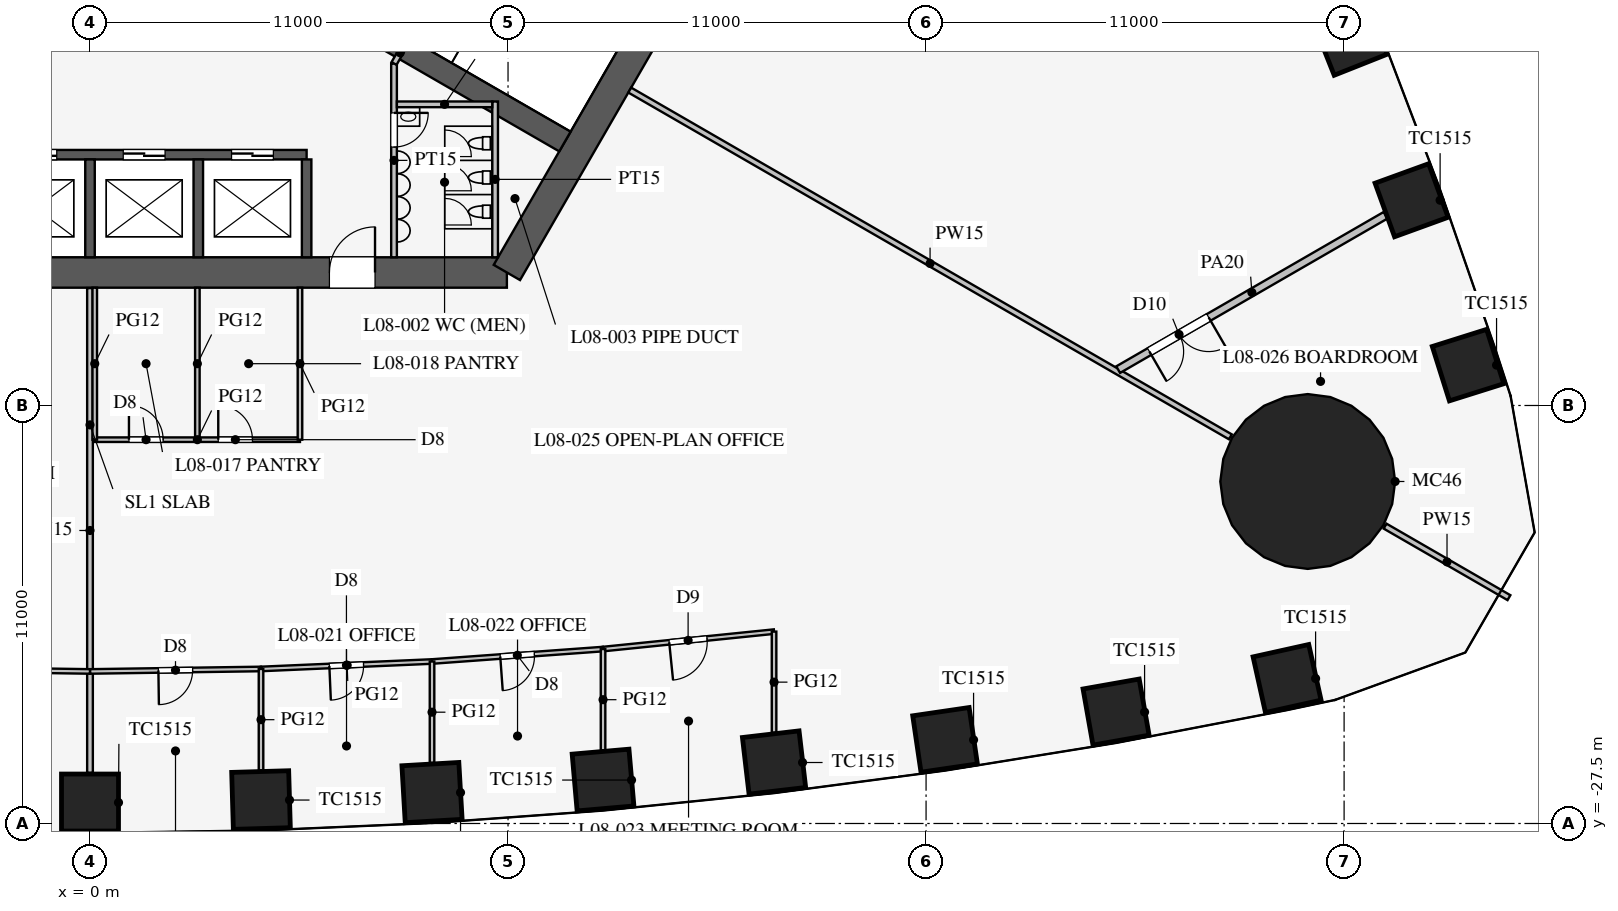
"""IFC4 building model, lengths in metres.
Left out: names, types, materials, properties, quantities, classifications, styles, units other than length and angle.
Written with IfcOpenShell. Run it as: python <this file> out.ifc"""

import sys

from ifc_helpers import new_model, si_unit, direction, frame, frame_2d, origin, origin_2d, place, context, subcontext, project, spatial, rectangle, circle, extrude, element, fill, save


model = new_model("IFC4")
c1 = context("Model", 3, precision=1e-05, world=origin(), true_north=direction((0.0, 1.0)))
c2 = subcontext(c1, "Body", "Model", "MODEL_VIEW")
j1 = project(units=[si_unit("LENGTHUNIT", "METRE"), si_unit("PLANEANGLEUNIT", "RADIAN")], contexts=[c1])
p1 = place(None, origin())
s1 = spatial("IfcSite", under=j1, at=p1, CompositionType="ELEMENT")
p2 = place(p1, origin())
s2 = spatial("IfcBuilding", under=s1, at=p2, CompositionType="ELEMENT")
p3 = place(p2, frame((0.0, 0.0, 37.5)))
s3 = spatial("IfcBuildingStorey", under=s2, at=p3, CompositionType="ELEMENT", Elevation=37.5)
for number, where, z_axis, x_axis in (
    (1, (0.0, -26.949, 0.0), (0.0, 0.0, 1.0), (1.0, 0.0, 0.0)),
    (2, (4.5, -26.883, 0.0), (0.0, 0.0, 1.0), (1.0, 0.029, 0.0)),
    (3, (9.0, -26.686, 0.0), (0.0, 0.0, 1.0), (0.998, 0.058, 0.0)),
    (4, (13.5, -26.357, 0.0), (0.0, 0.0, 1.0), (0.996, 0.087, 0.0)),
    (5, (18.0, -25.895, 0.0), (0.0, 0.0, 1.0), (0.993, 0.116, 0.0)),
    (6, (22.5, -25.299, 0.0), (0.0, 0.0, 1.0), (0.989, 0.145, 0.0)),
    (7, (27.0, -24.568, 0.0), (0.0, 0.0, 1.0), (0.985, 0.174, 0.0)),
    (8, (31.5, -23.685, 0.0), (0.0, 0.0, 1.0), (0.976, 0.217, 0.0)),
    (9, (36.262, -15.438, 0.0), (0.0, 0.0, 1.0), (-0.3, 0.954, 0.0)),
    (10, (34.776, -11.099, 0.0), (0.0, 0.0, 1.0), (-0.342, 0.94, 0.0)),
    (11, (33.16, -6.836, 0.0), (0.0, 0.0, 1.0), (-0.369, 0.929, 0.0)),
):
    element("IfcColumn", number, at=place(p3, frame(where, z_axis=z_axis, x_axis=x_axis)), inside=s3, PredefinedType="COLUMN", context=c2, shape_type="SweptSolid", body=[
        extrude(rectangle(XDim=1.5, YDim=1.5, at=origin_2d()), origin(), (0.0, 0.0, 1.0), 4.2),
    ])
p4 = place(p3, frame((32.043, -18.5, 0.0), z_axis=(0.0, 0.0, 1.0), x_axis=(1.0, 0.0, 0.0)))
e12 = element("IfcColumn", 12, at=p4, inside=s3, PredefinedType="COLUMN", context=c2, shape_type="SweptSolid", body=[
    extrude(circle(Radius=2.3, at=origin_2d()), origin(), (0.0, 0.0, 1.0), 4.2),
])
p5 = place(p3, frame((-10.97, -13.0, 0.0), z_axis=(0.0, 0.0, 1.0), x_axis=(1.0, 0.0, 0.0)))
e13 = element("IfcWall", 13, at=p5, inside=s3, PredefinedType="SHEAR", context=c2, shape_type="SweptSolid", body=[
    extrude(rectangle(XDim=21.939, YDim=0.8, at=frame_2d((10.97, 0.0))), origin(), (0.0, 0.0, 1.0), 4.2),
])
p6 = place(p5, frame((17.27, 0.0, 0.0)))
e14 = element("IfcOpeningElement", 14, at=p6, cuts=e13, PredefinedType="OPENING", context=c2, shape_type="SweptSolid", body=[
    extrude(rectangle(XDim=1.2, YDim=2.1, at=frame_2d((0.6, 1.05))), frame((0.0, 0.41, 0.0), z_axis=(0.0, -1.0, 0.0), x_axis=(1.0, 0.0, 0.0)), (0.0, 0.0, 1.0), 0.82),
])
p7 = place(p5, frame((3.47, 0.0, 0.0)))
e15 = element("IfcOpeningElement", 15, at=p7, cuts=e13, PredefinedType="OPENING", context=c2, shape_type="SweptSolid", body=[
    extrude(rectangle(XDim=1.2, YDim=2.1, at=frame_2d((0.6, 1.05))), frame((0.0, 0.41, 0.0), z_axis=(0.0, -1.0, 0.0), x_axis=(1.0, 0.0, 0.0)), (0.0, 0.0, 1.0), 0.82),
])
p8 = place(p3, frame((10.97, -13.0, 0.0), z_axis=(0.0, 0.0, 1.0), x_axis=(0.499995765644, 0.866027848477, 0.0)))
e16 = element("IfcWall", 16, at=p8, inside=s3, PredefinedType="SHEAR", context=c2, shape_type="SweptSolid", body=[
    extrude(rectangle(XDim=11.547, YDim=0.8, at=frame_2d((5.773, 0.0))), origin(), (0.0, 0.0, 1.0), 4.2),
])
p9 = place(p3, frame((-5.7, -9.9, 0.0), z_axis=(0.0, 0.0, 1.0), x_axis=(1.0, 0.0, 0.0)))
e17 = element("IfcWall", 17, at=p9, inside=s3, PredefinedType="SHEAR", context=c2, shape_type="SweptSolid", body=[
    extrude(rectangle(XDim=11.4, YDim=0.25, at=frame_2d((5.7, 0.0))), origin(), (0.0, 0.0, 1.0), 4.2),
])
p10 = place(p9, frame((0.875, 0.0, 0.0)))
e18 = element("IfcOpeningElement", 18, at=p10, cuts=e17, PredefinedType="OPENING", context=c2, shape_type="SweptSolid", body=[
    extrude(rectangle(XDim=1.1, YDim=2.2, at=frame_2d((0.55, 1.1))), frame((0.0, 0.135, 0.0), z_axis=(0.0, -1.0, 0.0), x_axis=(1.0, 0.0, 0.0)), (0.0, 0.0, 1.0), 0.27),
])
p11 = place(p9, frame((3.725, 0.0, 0.0)))
e19 = element("IfcOpeningElement", 19, at=p11, cuts=e17, PredefinedType="OPENING", context=c2, shape_type="SweptSolid", body=[
    extrude(rectangle(XDim=1.1, YDim=2.2, at=frame_2d((0.55, 1.1))), frame((0.0, 0.135, 0.0), z_axis=(0.0, -1.0, 0.0), x_axis=(1.0, 0.0, 0.0)), (0.0, 0.0, 1.0), 0.27),
])
p12 = place(p9, frame((6.575, 0.0, 0.0)))
e20 = element("IfcOpeningElement", 20, at=p12, cuts=e17, PredefinedType="OPENING", context=c2, shape_type="SweptSolid", body=[
    extrude(rectangle(XDim=1.1, YDim=2.2, at=frame_2d((0.55, 1.1))), frame((0.0, 0.135, 0.0), z_axis=(0.0, -1.0, 0.0), x_axis=(1.0, 0.0, 0.0)), (0.0, 0.0, 1.0), 0.27),
])
p13 = place(p9, frame((9.425, 0.0, 0.0)))
e21 = element("IfcOpeningElement", 21, at=p13, cuts=e17, PredefinedType="OPENING", context=c2, shape_type="SweptSolid", body=[
    extrude(rectangle(XDim=1.1, YDim=2.2, at=frame_2d((0.55, 1.1))), frame((0.0, 0.135, 0.0), z_axis=(0.0, -1.0, 0.0), x_axis=(1.0, 0.0, 0.0)), (0.0, 0.0, 1.0), 0.27),
])
for number, where, z_axis, x_axis in (
    (22, (0.0, -10.025, 0.0), (0.0, 0.0, 1.0), (0.0, -1.0, 0.0)),
    (23, (2.85, -10.025, 0.0), (0.0, 0.0, 1.0), (0.0, -1.0, 0.0)),
    (24, (5.7, -10.025, 0.0), (0.0, 0.0, 1.0), (0.0, -1.0, 0.0)),
):
    element("IfcWall", number, at=place(p3, frame(where, z_axis=z_axis, x_axis=x_axis)), inside=s3, PredefinedType="SHEAR", context=c2, shape_type="SweptSolid", body=[
        extrude(rectangle(XDim=2.575, YDim=0.25, at=frame_2d((1.288, 0.0))), origin(), (0.0, 0.0, 1.0), 4.2),
    ])
p14 = place(p3, frame((4.638, -5.016, 0.0), z_axis=(0.0, 0.0, 1.0), x_axis=(0.866019375473, -0.500010441196, 0.0)))
e25 = element("IfcWall", 25, at=p14, inside=s3, PredefinedType="SHEAR", context=c2, shape_type="SweptSolid", body=[
    extrude(rectangle(XDim=9.075, YDim=0.6, at=frame_2d((4.538, 0.0))), origin(), (0.0, 0.0, 1.0), 4.2),
])
p15 = place(p3, frame((8.0, -7.5, 0.0), z_axis=(0.0, 0.0, 1.0), x_axis=(0.0, -1.0, 0.0)))
e26 = element("IfcWall", 26, at=p15, inside=s3, PredefinedType="PARTITIONING", context=c2, shape_type="SweptSolid", body=[
    extrude(rectangle(XDim=5.1, YDim=0.15, at=frame_2d((2.55, 0.0))), origin(), (0.0, 0.0, 1.0), 4.0),
])
p16 = place(p15, frame((1.3, 0.0, 0.0)))
e27 = element("IfcOpeningElement", 27, at=p16, cuts=e26, PredefinedType="OPENING", context=c2, shape_type="SweptSolid", body=[
    extrude(rectangle(XDim=0.9, YDim=2.1, at=frame_2d((0.45, 1.05))), frame((0.0, 0.085, 0.0), z_axis=(0.0, -1.0, 0.0), x_axis=(1.0, 0.0, 0.0)), (0.0, 0.0, 1.0), 0.17),
])
p17 = place(p3, frame((8.0, -7.5, 0.0), z_axis=(0.0, 0.0, 1.0), x_axis=(0.499842556608, 0.866116284689, 0.0)))
e28 = element("IfcWall", 28, at=p17, inside=s3, PredefinedType="PARTITIONING", context=c2, shape_type="SweptSolid", body=[
    extrude(rectangle(XDim=0.645, YDim=0.15, at=frame_2d((0.323, 0.0))), origin(), (0.0, 0.0, 1.0), 4.0),
])
p18 = place(p3, frame((10.66, -8.5, 0.0), z_axis=(0.0, 0.0, 1.0), x_axis=(0.0, -1.0, 0.0)))
e29 = element("IfcWall", 29, at=p18, inside=s3, PredefinedType="PARTITIONING", context=c2, shape_type="SweptSolid", body=[
    extrude(rectangle(XDim=4.1, YDim=0.15, at=frame_2d((2.05, 0.0))), origin(), (0.0, 0.0, 1.0), 4.0),
])
p19 = place(p3, frame((8.075, -8.575, 0.0), z_axis=(0.0, 0.0, 1.0), x_axis=(1.0, 0.0, 0.0)))
e30 = element("IfcWall", 30, at=p19, inside=s3, PredefinedType="PARTITIONING", context=c2, shape_type="SweptSolid", body=[
    extrude(rectangle(XDim=2.51, YDim=0.15, at=frame_2d((1.255, 0.0))), origin(), (0.0, 0.0, 1.0), 4.0),
])
p20 = place(p3, frame((14.203, -8.2, 0.0), z_axis=(0.0, 0.0, 1.0), x_axis=(0.866024965723, -0.500000758745, 0.0)))
e31 = element("IfcWall", 31, at=p20, inside=s3, PredefinedType="PARTITIONING", context=c2, shape_type="SweptSolid", body=[
    extrude(rectangle(XDim=18.25, YDim=0.15, at=frame_2d((9.125, 0.0))), origin(), (0.0, 0.0, 1.0), 2.3),
])
p21 = place(p3, frame((34.078, -19.675, 0.0), z_axis=(0.0, 0.0, 1.0), x_axis=(0.866019247219, -0.500010663332, 0.0)))
e32 = element("IfcWall", 32, at=p21, inside=s3, PredefinedType="PARTITIONING", context=c2, shape_type="SweptSolid", body=[
    extrude(rectangle(XDim=3.764, YDim=0.15, at=frame_2d((1.882, 0.0))), origin(), (0.0, 0.0, 1.0), 2.3),
])
p22 = place(p3, frame((0.0, -13.41, 0.0), z_axis=(0.0, 0.0, 1.0), x_axis=(0.0, -1.0, 0.0)))
e33 = element("IfcWall", 33, at=p22, inside=s3, PredefinedType="PARTITIONING", context=c2, shape_type="SweptSolid", body=[
    extrude(rectangle(XDim=12.759, YDim=0.15, at=frame_2d((6.379, 0.0))), origin(), (0.0, 0.0, 1.0), 3.2),
])
p23 = place(p3, frame((0.125, -17.4, 0.0), z_axis=(0.0, 0.0, 1.0), x_axis=(1.0, 0.0, 0.0)))
e34 = element("IfcWall", 34, at=p23, inside=s3, PredefinedType="PARTITIONING", context=c2, shape_type="SweptSolid", body=[
    extrude(rectangle(XDim=2.7, YDim=0.12, at=frame_2d((1.35, 0.0))), origin(), (0.0, 0.0, 1.0), 2.9),
])
p24 = place(p23, frame((0.9, 0.0, 0.15)))
e35 = element("IfcOpeningElement", 35, at=p24, cuts=e34, PredefinedType="OPENING", context=c2, shape_type="SweptSolid", body=[
    extrude(rectangle(XDim=0.9, YDim=2.1, at=frame_2d((0.45, 1.05))), frame((0.0, 0.07, 0.0), z_axis=(0.0, -1.0, 0.0), x_axis=(1.0, 0.0, 0.0)), (0.0, 0.0, 1.0), 0.14),
])
p25 = place(p3, frame((2.825, -17.4, 0.0), z_axis=(0.0, 0.0, 1.0), x_axis=(1.0, 0.0, 0.0)))
e36 = element("IfcWall", 36, at=p25, inside=s3, PredefinedType="PARTITIONING", context=c2, shape_type="SweptSolid", body=[
    extrude(rectangle(XDim=2.7, YDim=0.12, at=frame_2d((1.35, 0.0))), origin(), (0.0, 0.0, 1.0), 2.9),
])
p26 = place(p25, frame((0.55, 0.0, 0.15)))
e37 = element("IfcOpeningElement", 37, at=p26, cuts=e36, PredefinedType="OPENING", context=c2, shape_type="SweptSolid", body=[
    extrude(rectangle(XDim=0.9, YDim=2.1, at=frame_2d((0.45, 1.05))), frame((0.0, 0.07, 0.0), z_axis=(0.0, -1.0, 0.0), x_axis=(1.0, 0.0, 0.0)), (0.0, 0.0, 1.0), 0.14),
])
for number, where, z_axis, x_axis in (
    (38, (0.125, -13.4, 0.0), (0.0, 0.0, 1.0), (0.0, -1.0, 0.0)),
    (39, (2.825, -13.4, 0.0), (0.0, 0.0, 1.0), (0.0, -1.0, 0.0)),
    (40, (5.525, -13.4, 0.0), (0.0, 0.0, 1.0), (0.0, -1.0, 0.0)),
):
    element("IfcWall", number, at=place(p3, frame(where, z_axis=z_axis, x_axis=x_axis)), inside=s3, PredefinedType="PARTITIONING", context=c2, shape_type="SweptSolid", body=[
        extrude(rectangle(XDim=4.0, YDim=0.12, at=frame_2d((2.0, 0.0))), origin(), (0.0, 0.0, 1.0), 2.9),
    ])
p27 = place(p3, frame((0.0, -23.499, 0.0), z_axis=(0.0, 0.0, 1.0), x_axis=(0.999894311967, 0.014538393859, 0.0)))
e41 = element("IfcWall", 41, at=p27, inside=s3, PredefinedType="PARTITIONING", context=c2, shape_type="SweptSolid", body=[
    extrude(rectangle(XDim=4.5, YDim=0.12, at=frame_2d((2.25, 0.0))), origin(), (0.0, 0.0, 1.0), 2.9),
])
p28 = place(p27, frame((1.8, 0.0, 0.15)))
e42 = element("IfcOpeningElement", 42, at=p28, cuts=e41, PredefinedType="OPENING", context=c2, shape_type="SweptSolid", body=[
    extrude(rectangle(XDim=0.9, YDim=2.1, at=frame_2d((0.45, 1.05))), frame((0.0, 0.07, 0.0), z_axis=(0.0, -1.0, 0.0), x_axis=(1.0, 0.0, 0.0)), (0.0, 0.0, 1.0), 0.14),
])
p29 = place(p3, frame((13.5, -22.91, 0.0), z_axis=(0.0, 0.0, 1.0), x_axis=(0.994833141332, 0.101523499286, 0.0)))
e43 = element("IfcWall", 43, at=p29, inside=s3, PredefinedType="PARTITIONING", context=c2, shape_type="SweptSolid", body=[
    extrude(rectangle(XDim=4.523, YDim=0.12, at=frame_2d((2.262, 0.0))), origin(), (0.0, 0.0, 1.0), 2.9),
])
p30 = place(p29, frame((1.75, 0.0, 0.15)))
e44 = element("IfcOpeningElement", 44, at=p30, cuts=e43, PredefinedType="OPENING", context=c2, shape_type="SweptSolid", body=[
    extrude(rectangle(XDim=1.0, YDim=2.1, at=frame_2d((0.5, 1.05))), frame((0.0, 0.07, 0.0), z_axis=(0.0, -1.0, 0.0), x_axis=(1.0, 0.0, 0.0)), (0.0, 0.0, 1.0), 0.14),
])
p31 = place(p3, frame((4.5, -23.433, 0.0), z_axis=(0.0, 0.0, 1.0), x_axis=(0.999052370647, 0.043524254212, 0.0)))
e45 = element("IfcWall", 45, at=p31, inside=s3, PredefinedType="PARTITIONING", context=c2, shape_type="SweptSolid", body=[
    extrude(rectangle(XDim=4.504, YDim=0.12, at=frame_2d((2.252, 0.0))), origin(), (0.0, 0.0, 1.0), 2.9),
])
p32 = place(p31, frame((1.8, 0.0, 0.15)))
e46 = element("IfcOpeningElement", 46, at=p32, cuts=e45, PredefinedType="OPENING", context=c2, shape_type="SweptSolid", body=[
    extrude(rectangle(XDim=0.9, YDim=2.1, at=frame_2d((0.45, 1.05))), frame((0.0, 0.07, 0.0), z_axis=(0.0, -1.0, 0.0), x_axis=(1.0, 0.0, 0.0)), (0.0, 0.0, 1.0), 0.14),
])
p33 = place(p3, frame((9.0, -23.237, 0.0), z_axis=(0.0, 0.0, 1.0), x_axis=(0.997363894896, 0.072562119306, 0.0)))
e47 = element("IfcWall", 47, at=p33, inside=s3, PredefinedType="PARTITIONING", context=c2, shape_type="SweptSolid", body=[
    extrude(rectangle(XDim=4.512, YDim=0.12, at=frame_2d((2.256, 0.0))), origin(), (0.0, 0.0, 1.0), 2.9),
])
p34 = place(p33, frame((1.8, 0.0, 0.15)))
e48 = element("IfcOpeningElement", 48, at=p34, cuts=e47, PredefinedType="OPENING", context=c2, shape_type="SweptSolid", body=[
    extrude(rectangle(XDim=0.9, YDim=2.1, at=frame_2d((0.45, 1.05))), frame((0.0, 0.07, 0.0), z_axis=(0.0, -1.0, 0.0), x_axis=(1.0, 0.0, 0.0)), (0.0, 0.0, 1.0), 0.14),
])
p35 = place(p3, frame((-4.5, -23.433, 0.0), z_axis=(0.0, 0.0, 1.0), x_axis=(0.999894311967, -0.014538393859, 0.0)))
e49 = element("IfcWall", 49, at=p35, inside=s3, PredefinedType="PARTITIONING", context=c2, shape_type="SweptSolid", body=[
    extrude(rectangle(XDim=4.5, YDim=0.12, at=frame_2d((2.25, 0.0))), origin(), (0.0, 0.0, 1.0), 2.9),
])
p36 = place(p35, frame((1.8, 0.0, 0.15)))
e50 = element("IfcOpeningElement", 50, at=p36, cuts=e49, PredefinedType="OPENING", context=c2, shape_type="SweptSolid", body=[
    extrude(rectangle(XDim=0.9, YDim=2.1, at=frame_2d((0.45, 1.05))), frame((0.0, 0.07, 0.0), z_axis=(0.0, -1.0, 0.0), x_axis=(1.0, 0.0, 0.0)), (0.0, 0.0, 1.0), 0.14),
])
p37 = place(p3, frame((13.5, -22.91, 0.0), z_axis=(0.0, 0.0, 1.0), x_axis=(0.0, -1.0, 0.0)))
e51 = element("IfcWall", 51, at=p37, inside=s3, PredefinedType="PARTITIONING", context=c2, shape_type="SweptSolid", body=[
    extrude(rectangle(XDim=2.664, YDim=0.12, at=frame_2d((1.332, 0.0))), origin(), (0.0, 0.0, 1.0), 2.9),
])
p38 = place(p3, frame((18.0, -22.451, 0.0), z_axis=(0.0, 0.0, 1.0), x_axis=(0.0, -1.0, 0.0)))
e52 = element("IfcWall", 52, at=p38, inside=s3, PredefinedType="PARTITIONING", context=c2, shape_type="SweptSolid", body=[
    extrude(rectangle(XDim=2.659, YDim=0.12, at=frame_2d((1.33, 0.0))), origin(), (0.0, 0.0, 1.0), 2.9),
])
p39 = place(p3, frame((4.5, -23.433, 0.0), z_axis=(0.0, 0.0, 1.0), x_axis=(0.0, -1.0, 0.0)))
e53 = element("IfcWall", 53, at=p39, inside=s3, PredefinedType="PARTITIONING", context=c2, shape_type="SweptSolid", body=[
    extrude(rectangle(XDim=2.669, YDim=0.12, at=frame_2d((1.335, 0.0))), origin(), (0.0, 0.0, 1.0), 2.9),
])
p40 = place(p3, frame((9.0, -23.237, 0.0), z_axis=(0.0, 0.0, 1.0), x_axis=(0.0, -1.0, 0.0)))
e54 = element("IfcWall", 54, at=p40, inside=s3, PredefinedType="PARTITIONING", context=c2, shape_type="SweptSolid", body=[
    extrude(rectangle(XDim=2.667, YDim=0.12, at=frame_2d((1.334, 0.0))), origin(), (0.0, 0.0, 1.0), 2.9),
])
p41 = place(p3, frame((27.055, -15.557, 0.0), z_axis=(0.0, 0.0, 1.0), x_axis=(0.866026445548, 0.499998195608, 0.0)))
e55 = element("IfcWall", 55, at=p41, inside=s3, PredefinedType="PARTITIONING", context=c2, shape_type="SweptSolid", body=[
    extrude(rectangle(XDim=8.124, YDim=0.2, at=frame_2d((4.062, 0.0))), origin(), (0.0, 0.0, 1.0), 2.9),
])
p42 = place(p41, frame((0.95, 0.0, 0.15)))
e56 = element("IfcOpeningElement", 56, at=p42, cuts=e55, PredefinedType="OPENING", context=c2, shape_type="SweptSolid", body=[
    extrude(rectangle(XDim=1.8, YDim=2.1, at=frame_2d((0.9, 1.05))), frame((0.0, 0.11, 0.0), z_axis=(0.0, -1.0, 0.0), x_axis=(1.0, 0.0, 0.0)), (0.0, 0.0, 1.0), 0.22),
])
p43 = place(p16, origin())
e57 = element("IfcDoor", 57, at=p43, inside=s3, OperationType="SINGLE_SWING_LEFT", PredefinedType="DOOR", context=c2, shape_type="SweptSolid", body=[
    extrude(rectangle(XDim=0.9, YDim=2.1, at=frame_2d((0.45, 1.05))), frame((0.0, 0.025, 0.0), z_axis=(0.0, -1.0, 0.0), x_axis=(1.0, 0.0, 0.0)), (0.0, 0.0, 1.0), 0.05),
])
fill(e27, e57)
p44 = place(p6, origin())
e58 = element("IfcDoor", 58, at=p44, inside=s3, OperationType="SINGLE_SWING_RIGHT", PredefinedType="DOOR", context=c2, shape_type="SweptSolid", body=[
    extrude(rectangle(XDim=1.2, YDim=2.1, at=frame_2d((0.6, 1.05))), frame((0.0, 0.025, 0.0), z_axis=(0.0, -1.0, 0.0), x_axis=(1.0, 0.0, 0.0)), (0.0, 0.0, 1.0), 0.05),
])
fill(e14, e58)
p45 = place(p24, origin())
e59 = element("IfcDoor", 59, at=p45, inside=s3, OperationType="SINGLE_SWING_LEFT", PredefinedType="DOOR", context=c2, shape_type="SweptSolid", body=[
    extrude(rectangle(XDim=0.9, YDim=2.1, at=frame_2d((0.45, 1.05))), frame((0.0, 0.025, 0.0), z_axis=(0.0, -1.0, 0.0), x_axis=(1.0, 0.0, 0.0)), (0.0, 0.0, 1.0), 0.05),
])
fill(e35, e59)
p46 = place(p26, origin())
e60 = element("IfcDoor", 60, at=p46, inside=s3, OperationType="SINGLE_SWING_LEFT", PredefinedType="DOOR", context=c2, shape_type="SweptSolid", body=[
    extrude(rectangle(XDim=0.9, YDim=2.1, at=frame_2d((0.45, 1.05))), frame((0.0, 0.025, 0.0), z_axis=(0.0, -1.0, 0.0), x_axis=(1.0, 0.0, 0.0)), (0.0, 0.0, 1.0), 0.05),
])
fill(e37, e60)
p47 = place(p28, frame((0.9, 0.0, 0.0), z_axis=(0.0, 0.0, 1.0), x_axis=(-1.0, 0.0, 0.0)))
e61 = element("IfcDoor", 61, at=p47, inside=s3, OperationType="SINGLE_SWING_RIGHT", PredefinedType="DOOR", context=c2, shape_type="SweptSolid", body=[
    extrude(rectangle(XDim=0.9, YDim=2.1, at=frame_2d((0.45, 1.05))), frame((0.0, 0.025, 0.0), z_axis=(0.0, -1.0, 0.0), x_axis=(1.0, 0.0, 0.0)), (0.0, 0.0, 1.0), 0.05),
])
fill(e42, e61)
p48 = place(p32, frame((0.9, 0.0, 0.0), z_axis=(0.0, 0.0, 1.0), x_axis=(-1.0, 0.0, 0.0)))
e62 = element("IfcDoor", 62, at=p48, inside=s3, OperationType="SINGLE_SWING_RIGHT", PredefinedType="DOOR", context=c2, shape_type="SweptSolid", body=[
    extrude(rectangle(XDim=0.9, YDim=2.1, at=frame_2d((0.45, 1.05))), frame((0.0, 0.025, 0.0), z_axis=(0.0, -1.0, 0.0), x_axis=(1.0, 0.0, 0.0)), (0.0, 0.0, 1.0), 0.05),
])
fill(e46, e62)
p49 = place(p34, frame((0.9, 0.0, 0.0), z_axis=(0.0, 0.0, 1.0), x_axis=(-1.0, 0.0, 0.0)))
e63 = element("IfcDoor", 63, at=p49, inside=s3, OperationType="SINGLE_SWING_RIGHT", PredefinedType="DOOR", context=c2, shape_type="SweptSolid", body=[
    extrude(rectangle(XDim=0.9, YDim=2.1, at=frame_2d((0.45, 1.05))), frame((0.0, 0.025, 0.0), z_axis=(0.0, -1.0, 0.0), x_axis=(1.0, 0.0, 0.0)), (0.0, 0.0, 1.0), 0.05),
])
fill(e48, e63)
p50 = place(p30, frame((1.0, 0.0, 0.0), z_axis=(0.0, 0.0, 1.0), x_axis=(-1.0, 0.0, 0.0)))
e64 = element("IfcDoor", 64, at=p50, inside=s3, OperationType="SINGLE_SWING_RIGHT", PredefinedType="DOOR", context=c2, shape_type="SweptSolid", body=[
    extrude(rectangle(XDim=1.0, YDim=2.1, at=frame_2d((0.5, 1.05))), frame((0.0, 0.025, 0.0), z_axis=(0.0, -1.0, 0.0), x_axis=(1.0, 0.0, 0.0)), (0.0, 0.0, 1.0), 0.05),
])
fill(e44, e64)
p51 = place(p42, frame((1.8, 0.0, 0.0), z_axis=(0.0, 0.0, 1.0), x_axis=(-1.0, 0.0, 0.0)))
e65 = element("IfcDoor", 65, at=p51, inside=s3, OperationType="DOUBLE_DOOR_SINGLE_SWING", PredefinedType="DOOR", context=c2, shape_type="SweptSolid", body=[
    extrude(rectangle(XDim=1.8, YDim=2.1, at=frame_2d((0.9, 1.05))), frame((0.0, 0.025, 0.0), z_axis=(0.0, -1.0, 0.0), x_axis=(1.0, 0.0, 0.0)), (0.0, 0.0, 1.0), 0.05),
])
fill(e56, e65)
p52 = place(p11, origin())
e66 = element("IfcDoor", 66, at=p52, inside=s3, OperationType="DOUBLE_DOOR_SLIDING", PredefinedType="DOOR", context=c2, shape_type="SweptSolid", body=[
    extrude(rectangle(XDim=1.1, YDim=2.2, at=frame_2d((0.55, 1.1))), frame((0.0, 0.025, 0.0), z_axis=(0.0, -1.0, 0.0), x_axis=(1.0, 0.0, 0.0)), (0.0, 0.0, 1.0), 0.05),
])
fill(e19, e66)
p53 = place(p12, origin())
e67 = element("IfcDoor", 67, at=p53, inside=s3, OperationType="DOUBLE_DOOR_SLIDING", PredefinedType="DOOR", context=c2, shape_type="SweptSolid", body=[
    extrude(rectangle(XDim=1.1, YDim=2.2, at=frame_2d((0.55, 1.1))), frame((0.0, 0.025, 0.0), z_axis=(0.0, -1.0, 0.0), x_axis=(1.0, 0.0, 0.0)), (0.0, 0.0, 1.0), 0.05),
])
fill(e20, e67)
p54 = place(p13, origin())
e68 = element("IfcDoor", 68, at=p54, inside=s3, OperationType="DOUBLE_DOOR_SLIDING", PredefinedType="DOOR", context=c2, shape_type="SweptSolid", body=[
    extrude(rectangle(XDim=1.1, YDim=2.2, at=frame_2d((0.55, 1.1))), frame((0.0, 0.025, 0.0), z_axis=(0.0, -1.0, 0.0), x_axis=(1.0, 0.0, 0.0)), (0.0, 0.0, 1.0), 0.05),
])
fill(e21, e68)
save(model, sys.argv[1])
